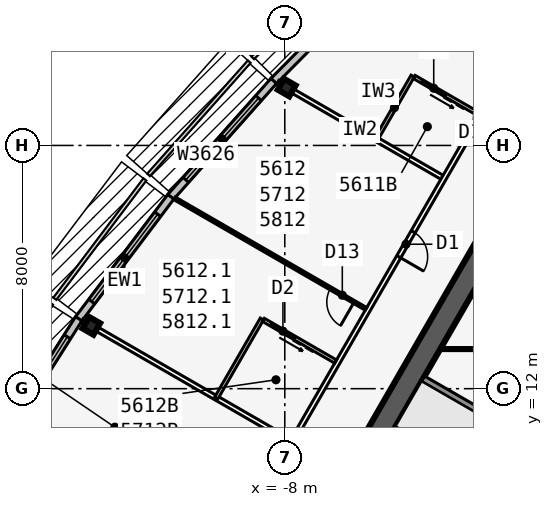
"""IFC4 building model, lengths in metres.
Left out: names, types, materials, properties, quantities, classifications, styles, units other than length and angle.
Written with IfcOpenShell. Run it as: python <this file> out.ifc"""

import sys

from ifc_helpers import new_model, si_unit, direction, frame, frame_2d, origin, origin_2d, place, context, subcontext, project, spatial, rectangle, i_section, extrude, element, fill, save


model = new_model("IFC4")
c1 = context("Model", 3, precision=1e-05, world=origin(), true_north=direction((0.0, 1.0)))
c2 = subcontext(c1, "Body", "Model", "MODEL_VIEW")
j1 = project(units=[si_unit("LENGTHUNIT", "METRE"), si_unit("PLANEANGLEUNIT", "RADIAN")], contexts=[c1])
p1 = place(None, origin())
s1 = spatial("IfcSite", under=j1, at=p1, CompositionType="ELEMENT")
p2 = place(p1, origin())
s2 = spatial("IfcBuilding", under=s1, at=p2, CompositionType="ELEMENT")
p3 = place(p2, frame((0.0, 0.0, 211.7)))
s3 = spatial("IfcBuildingStorey", under=s2, at=p3, CompositionType="ELEMENT", Elevation=211.7)
p4 = place(p3, frame((0.0, 19.052, 0.0), z_axis=(0.0, 0.0, 1.0), x_axis=(-0.499999749417, -0.866025548458, 0.0)))
e1 = element("IfcWall", 1, at=p4, inside=s3, PredefinedType="SHEAR", context=c2, shape_type="SweptSolid", body=[
    extrude(rectangle(XDim=33.0, YDim=0.75, at=frame_2d((16.5, 0.0))), origin(), (0.0, 0.0, 1.0), 3.6),
])
p5 = place(p4, frame((14.15, 0.0, 0.0)))
e2 = element("IfcOpeningElement", 2, at=p5, cuts=e1, PredefinedType="OPENING", context=c2, shape_type="SweptSolid", body=[
    extrude(rectangle(XDim=1.8, YDim=2.13, at=frame_2d((0.9, 1.065))), frame((0.0, 0.385, 0.0), z_axis=(0.0, -1.0, 0.0), x_axis=(1.0, 0.0, 0.0)), (0.0, 0.0, 1.0), 0.77),
])
p6 = place(p4, frame((12.6, 0.0, 0.0)))
e3 = element("IfcOpeningElement", 3, at=p6, cuts=e1, PredefinedType="OPENING", context=c2, shape_type="SweptSolid", body=[
    extrude(rectangle(XDim=1.0, YDim=2.13, at=frame_2d((0.5, 1.065))), frame((0.0, 0.385, 0.0), z_axis=(0.0, -1.0, 0.0), x_axis=(1.0, 0.0, 0.0)), (0.0, 0.0, 1.0), 0.77),
])
p7 = place(p3, frame((-0.062, 11.794, 0.0), z_axis=(0.0, 0.0, 1.0), x_axis=(-0.500006680225, -0.86602154692, 0.0)))
e4 = element("IfcWall", 4, at=p7, inside=s3, PredefinedType="SOLIDWALL", context=c2, shape_type="SweptSolid", body=[
    extrude(rectangle(XDim=7.733, YDim=0.25, at=frame_2d((3.866, 0.0))), origin(), (0.0, 0.0, 1.0), 3.435),
])
p8 = place(p3, frame((-0.679, 10.727, 0.0), z_axis=(0.0, 0.0, 1.0), x_axis=(-0.866008981251, 0.500028443584, 0.0)))
e5 = element("IfcWall", 5, at=p8, inside=s3, PredefinedType="SOLIDWALL", context=c2, shape_type="SweptSolid", body=[
    extrude(rectangle(XDim=3.2, YDim=0.2, at=frame_2d((1.6, 0.0))), origin(), (0.0, 0.0, 1.0), 3.435),
])
for number, where, z_axis, x_axis in (
    (6, (-7.937, 21.903, 0.0), (0.0, 0.0, 1.0), (-0.5, -0.866, 0.0)),
    (7, (-14.363, 14.066, 0.0), (0.0, 0.0, 1.0), (-0.866, 0.5, 0.0)),
):
    element("IfcColumn", number, at=place(p3, frame(where, z_axis=z_axis, x_axis=x_axis)), inside=s3, PredefinedType="COLUMN", context=c2, shape_type="SweptSolid", body=[
        extrude(i_section(OverallWidth=0.411, OverallDepth=0.434, WebThickness=0.036, FlangeThickness=0.057, at=origin_2d()), origin(), (0.0, 0.0, 1.0), 3.6),
    ])
p9 = place(p3, frame((-6.911, 23.583, 0.0), z_axis=(0.0, 0.0, 1.0), x_axis=(-0.704149946111, -0.710051303352, 0.0)))
e8 = element("IfcWall", 8, at=p9, inside=s3, PredefinedType="STANDARD", context=c2, shape_type="SweptSolid", body=[
    extrude(rectangle(XDim=2.069, YDim=0.25, at=frame_2d((1.034, 0.0))), origin(), (0.0, 0.0, 1.0), 3.435),
])
p10 = place(p3, frame((-8.363, 22.12, 0.0), z_axis=(0.0, 0.0, 1.0), x_axis=(-0.664348996191, -0.747422511876, 0.0)))
e9 = element("IfcWall", 9, at=p10, inside=s3, PredefinedType="STANDARD", context=c2, shape_type="SweptSolid", body=[
    extrude(rectangle(XDim=5.105, YDim=0.25, at=frame_2d((2.552, 0.0))), origin(), (0.0, 0.0, 1.0), 3.435),
])
p11 = place(p10, frame((0.752, 0.0, 0.45)))
e10 = element("IfcOpeningElement", 10, at=p11, cuts=e9, PredefinedType="OPENING", context=c2, shape_type="SweptSolid", body=[
    extrude(rectangle(XDim=3.6, YDim=2.6, at=frame_2d((1.8, 1.3))), frame((0.0, 0.135, 0.0), z_axis=(0.0, -1.0, 0.0), x_axis=(1.0, 0.0, 0.0)), (0.0, 0.0, 1.0), 0.27),
])
p12 = place(p3, frame((-11.748, 18.312, 0.0), z_axis=(0.0, 0.0, 1.0), x_axis=(-0.602408653511, -0.798187831388, 0.0)))
e11 = element("IfcWall", 11, at=p12, inside=s3, PredefinedType="STANDARD", context=c2, shape_type="SweptSolid", body=[
    extrude(rectangle(XDim=5.038, YDim=0.25, at=frame_2d((2.519, 0.0))), origin(), (0.0, 0.0, 1.0), 3.435),
])
p13 = place(p12, frame((0.719, 0.0, 0.45)))
e12 = element("IfcOpeningElement", 12, at=p13, cuts=e11, PredefinedType="OPENING", context=c2, shape_type="SweptSolid", body=[
    extrude(rectangle(XDim=3.6, YDim=2.6, at=frame_2d((1.8, 1.3))), frame((0.0, 0.135, 0.0), z_axis=(0.0, -1.0, 0.0), x_axis=(1.0, 0.0, 0.0)), (0.0, 0.0, 1.0), 0.27),
])
p14 = place(p3, frame((-14.777, 14.299, 0.0), z_axis=(0.0, 0.0, 1.0), x_axis=(-0.535220361449, -0.844712474568, 0.0)))
e13 = element("IfcWall", 13, at=p14, inside=s3, PredefinedType="STANDARD", context=c2, shape_type="SweptSolid", body=[
    extrude(rectangle(XDim=5.004, YDim=0.25, at=frame_2d((2.502, 0.0))), origin(), (0.0, 0.0, 1.0), 3.435),
])
p15 = place(p14, frame((0.702, 0.0, 0.45)))
e14 = element("IfcOpeningElement", 14, at=p15, cuts=e13, PredefinedType="OPENING", context=c2, shape_type="SweptSolid", body=[
    extrude(rectangle(XDim=3.6, YDim=2.6, at=frame_2d((1.8, 1.3))), frame((0.0, 0.135, 0.0), z_axis=(0.0, -1.0, 0.0), x_axis=(1.0, 0.0, 0.0)), (0.0, 0.0, 1.0), 0.27),
])
p16 = place(p3, frame((-0.425, 22.966, 0.0), z_axis=(0.0, 0.0, 1.0), x_axis=(-0.500000265775, -0.866025250339, 0.0)))
e15 = element("IfcWall", 15, at=p16, inside=s3, PredefinedType="PARTITIONING", context=c2, shape_type="SweptSolid", body=[
    extrude(rectangle(XDim=39.354, YDim=0.15, at=frame_2d((19.677, 0.0))), origin(), (0.0, 0.0, 1.0), 3.435),
])
p17 = place(p16, frame((1.102, 0.0, 0.0)))
e16 = element("IfcOpeningElement", 16, at=p17, cuts=e15, PredefinedType="OPENING", context=c2, shape_type="SweptSolid", body=[
    extrude(rectangle(XDim=0.95, YDim=2.13, at=frame_2d((0.475, 1.065))), frame((0.0, 0.085, 0.0), z_axis=(0.0, -1.0, 0.0), x_axis=(1.0, 0.0, 0.0)), (0.0, 0.0, 1.0), 0.17),
])
p18 = place(p16, frame((6.702, 0.0, 0.0)))
e17 = element("IfcOpeningElement", 17, at=p18, cuts=e15, PredefinedType="OPENING", context=c2, shape_type="SweptSolid", body=[
    extrude(rectangle(XDim=0.95, YDim=2.13, at=frame_2d((0.475, 1.065))), frame((0.0, 0.085, 0.0), z_axis=(0.0, -1.0, 0.0), x_axis=(1.0, 0.0, 0.0)), (0.0, 0.0, 1.0), 0.17),
])
p19 = place(p16, frame((16.702, 0.0, 0.0)))
e18 = element("IfcOpeningElement", 18, at=p19, cuts=e15, PredefinedType="OPENING", context=c2, shape_type="SweptSolid", body=[
    extrude(rectangle(XDim=0.95, YDim=2.13, at=frame_2d((0.475, 1.065))), frame((0.0, 0.085, 0.0), z_axis=(0.0, -1.0, 0.0), x_axis=(1.0, 0.0, 0.0)), (0.0, 0.0, 1.0), 0.17),
])
p20 = place(p16, frame((26.102, 0.0, 0.0)))
e19 = element("IfcOpeningElement", 19, at=p20, cuts=e15, PredefinedType="OPENING", context=c2, shape_type="SweptSolid", body=[
    extrude(rectangle(XDim=0.95, YDim=2.13, at=frame_2d((0.475, 1.065))), frame((0.0, 0.085, 0.0), z_axis=(0.0, -1.0, 0.0), x_axis=(1.0, 0.0, 0.0)), (0.0, 0.0, 1.0), 0.17),
])
p21 = place(p16, frame((32.302, 0.0, 0.0)))
e20 = element("IfcOpeningElement", 20, at=p21, cuts=e15, PredefinedType="OPENING", context=c2, shape_type="SweptSolid", body=[
    extrude(rectangle(XDim=0.95, YDim=2.13, at=frame_2d((0.475, 1.065))), frame((0.0, 0.085, 0.0), z_axis=(0.0, -1.0, 0.0), x_axis=(1.0, 0.0, 0.0)), (0.0, 0.0, 1.0), 0.17),
])
p22 = place(p16, frame((37.302, 0.0, 0.0)))
e21 = element("IfcOpeningElement", 21, at=p22, cuts=e15, PredefinedType="OPENING", context=c2, shape_type="SweptSolid", body=[
    extrude(rectangle(XDim=0.95, YDim=2.13, at=frame_2d((0.475, 1.065))), frame((0.0, 0.085, 0.0), z_axis=(0.0, -1.0, 0.0), x_axis=(1.0, 0.0, 0.0)), (0.0, 0.0, 1.0), 0.17),
])
p23 = place(p3, frame((-2.829, 18.954, 0.0), z_axis=(0.0, 0.0, 1.0), x_axis=(-0.866026604282, 0.499997920671, 0.0)))
e22 = element("IfcWall", 22, at=p23, inside=s3, PredefinedType="PARTITIONING", context=c2, shape_type="SweptSolid", body=[
    extrude(rectangle(XDim=6.24, YDim=0.15, at=frame_2d((3.12, 0.0))), origin(), (0.0, 0.0, 1.0), 2.589),
])
p24 = place(p3, frame((-5.329, 14.623, 0.0), z_axis=(0.0, 0.0, 1.0), x_axis=(-0.866017877653, 0.500013035415, 0.0)))
e23 = element("IfcWall", 23, at=p24, inside=s3, PredefinedType="PARTITIONING", context=c2, shape_type="SweptSolid", body=[
    extrude(rectangle(XDim=7.273, YDim=0.1, at=frame_2d((3.636, 0.0))), origin(), (0.0, 0.0, 1.0), 2.589),
])
p25 = place(p24, frame((0.45, 0.0, 0.0)))
e24 = element("IfcOpeningElement", 24, at=p25, cuts=e23, PredefinedType="OPENING", context=c2, shape_type="SweptSolid", body=[
    extrude(rectangle(XDim=0.9, YDim=2.13, at=frame_2d((0.45, 1.065))), frame((0.0, 0.06, 0.0), z_axis=(0.0, -1.0, 0.0), x_axis=(1.0, 0.0, 0.0)), (0.0, 0.0, 1.0), 0.12),
])
p26 = place(p3, frame((-7.829, 10.293, 0.0), z_axis=(0.0, 0.0, 1.0), x_axis=(-0.866030558329, 0.49999107196, 0.0)))
e25 = element("IfcWall", 25, at=p26, inside=s3, PredefinedType="PARTITIONING", context=c2, shape_type="SweptSolid", body=[
    extrude(rectangle(XDim=7.894, YDim=0.15, at=frame_2d((3.947, 0.0))), origin(), (0.0, 0.0, 1.0), 2.589),
])
p27 = place(p3, frame((-3.793, 22.282, 0.0), z_axis=(0.0, 0.0, 1.0), x_axis=(-0.500001309137, -0.866024647952, 0.0)))
e26 = element("IfcWall", 26, at=p27, inside=s3, PredefinedType="PLUMBINGWALL", context=c2, shape_type="SweptSolid", body=[
    extrude(rectangle(XDim=2.4, YDim=0.12, at=frame_2d((1.2, 0.0))), origin(), (0.0, 0.0, 1.0), 3.435),
])
p28 = place(p3, frame((-1.628, 21.032, 0.0), z_axis=(0.0, 0.0, 1.0), x_axis=(-0.866048967903, 0.499959183527, 0.0)))
e27 = element("IfcWall", 27, at=p28, inside=s3, PredefinedType="PLUMBINGWALL", context=c2, shape_type="SweptSolid", body=[
    extrude(rectangle(XDim=2.44, YDim=0.12, at=frame_2d((1.22, 0.0))), origin(), (0.0, 0.0, 1.0), 3.435),
])
p29 = place(p28, frame((1.25, 0.0, 0.0)))
e28 = element("IfcOpeningElement", 28, at=p29, cuts=e27, PredefinedType="OPENING", context=c2, shape_type="SweptSolid", body=[
    extrude(rectangle(XDim=0.9, YDim=2.13, at=frame_2d((0.45, 1.065))), frame((0.0, 0.07, 0.0), z_axis=(0.0, -1.0, 0.0), x_axis=(1.0, 0.0, 0.0)), (0.0, 0.0, 1.0), 0.14),
])
p30 = place(p3, frame((-8.753, 14.291, 0.0), z_axis=(0.0, 0.0, 1.0), x_axis=(-0.50002537861, -0.866010750942, 0.0)))
e29 = element("IfcWall", 29, at=p30, inside=s3, PredefinedType="PLUMBINGWALL", context=c2, shape_type="SweptSolid", body=[
    extrude(rectangle(XDim=3.0, YDim=0.12, at=frame_2d((1.5, 0.0))), origin(), (0.0, 0.0, 1.0), 3.435),
])
p31 = place(p3, frame((-6.329, 12.891, 0.0), z_axis=(0.0, 0.0, 1.0), x_axis=(-0.866035715982, 0.499982138324, 0.0)))
e30 = element("IfcWall", 30, at=p31, inside=s3, PredefinedType="PLUMBINGWALL", context=c2, shape_type="SweptSolid", body=[
    extrude(rectangle(XDim=2.74, YDim=0.12, at=frame_2d((1.37, 0.0))), origin(), (0.0, 0.0, 1.0), 3.435),
])
p32 = place(p31, frame((1.55, 0.0, 0.0)))
e31 = element("IfcOpeningElement", 31, at=p32, cuts=e30, PredefinedType="OPENING", context=c2, shape_type="SweptSolid", body=[
    extrude(rectangle(XDim=0.9, YDim=2.13, at=frame_2d((0.45, 1.065))), frame((0.0, 0.07, 0.0), z_axis=(0.0, -1.0, 0.0), x_axis=(1.0, 0.0, 0.0)), (0.0, 0.0, 1.0), 0.14),
])
p33 = place(p3, frame((-2.887, 13.302, 0.0), z_axis=(0.0, 0.0, 1.0), x_axis=(1.0, 0.0, 0.0)))
e32 = element("IfcWall", 32, at=p33, inside=s3, PredefinedType="PARTITIONING", context=c2, shape_type="SweptSolid", body=[
    extrude(rectangle(XDim=5.773, YDim=0.1, at=frame_2d((2.887, 0.0))), origin(), (0.0, 0.0, 1.0), 3.435),
])
p34 = place(p33, frame((2.437, 0.0, 0.0)))
e33 = element("IfcOpeningElement", 33, at=p34, cuts=e32, PredefinedType="OPENING", context=c2, shape_type="SweptSolid", body=[
    extrude(rectangle(XDim=0.9, YDim=2.13, at=frame_2d((0.45, 1.065))), frame((0.0, 0.06, 0.0), z_axis=(0.0, -1.0, 0.0), x_axis=(1.0, 0.0, 0.0)), (0.0, 0.0, 1.0), 0.12),
])
p35 = place(p11, origin())
e34 = element("IfcWindow", 34, at=p35, inside=s3, PartitioningType="SINGLE_PANEL", PredefinedType="WINDOW", context=c2, shape_type="SweptSolid", body=[
    extrude(rectangle(XDim=3.6, YDim=2.6, at=frame_2d((1.8, 1.3))), frame((0.0, 0.03, 0.0), z_axis=(0.0, -1.0, 0.0), x_axis=(1.0, 0.0, 0.0)), (0.0, 0.0, 1.0), 0.06),
])
fill(e10, e34)
p36 = place(p13, origin())
e35 = element("IfcWindow", 35, at=p36, inside=s3, PartitioningType="SINGLE_PANEL", PredefinedType="WINDOW", context=c2, shape_type="SweptSolid", body=[
    extrude(rectangle(XDim=3.6, YDim=2.6, at=frame_2d((1.8, 1.3))), frame((0.0, 0.03, 0.0), z_axis=(0.0, -1.0, 0.0), x_axis=(1.0, 0.0, 0.0)), (0.0, 0.0, 1.0), 0.06),
])
fill(e12, e35)
p37 = place(p15, origin())
e36 = element("IfcWindow", 36, at=p37, inside=s3, PartitioningType="SINGLE_PANEL", PredefinedType="WINDOW", context=c2, shape_type="SweptSolid", body=[
    extrude(rectangle(XDim=3.6, YDim=2.6, at=frame_2d((1.8, 1.3))), frame((0.0, 0.03, 0.0), z_axis=(0.0, -1.0, 0.0), x_axis=(1.0, 0.0, 0.0)), (0.0, 0.0, 1.0), 0.06),
])
fill(e14, e36)
p38 = place(p25, origin())
e37 = element("IfcDoor", 37, at=p38, inside=s3, OperationType="SINGLE_SWING_LEFT", PredefinedType="DOOR", context=c2, shape_type="SweptSolid", body=[
    extrude(rectangle(XDim=0.9, YDim=2.13, at=frame_2d((0.45, 1.065))), frame((0.0, 0.025, 0.0), z_axis=(0.0, -1.0, 0.0), x_axis=(1.0, 0.0, 0.0)), (0.0, 0.0, 1.0), 0.05),
])
fill(e24, e37)
p39 = place(p29, origin())
e38 = element("IfcDoor", 38, at=p39, inside=s3, OperationType="SLIDING_TO_LEFT", PredefinedType="DOOR", context=c2, shape_type="SweptSolid", body=[
    extrude(rectangle(XDim=0.9, YDim=2.13, at=frame_2d((0.45, 1.065))), frame((0.0, 0.025, 0.0), z_axis=(0.0, -1.0, 0.0), x_axis=(1.0, 0.0, 0.0)), (0.0, 0.0, 1.0), 0.05),
])
fill(e28, e38)
p40 = place(p18, origin())
e39 = element("IfcDoor", 39, at=p40, inside=s3, OperationType="SINGLE_SWING_RIGHT", PredefinedType="DOOR", context=c2, shape_type="SweptSolid", body=[
    extrude(rectangle(XDim=0.95, YDim=2.13, at=frame_2d((0.475, 1.065))), frame((0.0, 0.025, 0.0), z_axis=(0.0, -1.0, 0.0), x_axis=(1.0, 0.0, 0.0)), (0.0, 0.0, 1.0), 0.05),
])
fill(e17, e39)
p41 = place(p32, origin())
e40 = element("IfcDoor", 40, at=p41, inside=s3, OperationType="SLIDING_TO_LEFT", PredefinedType="DOOR", context=c2, shape_type="SweptSolid", body=[
    extrude(rectangle(XDim=0.9, YDim=2.13, at=frame_2d((0.45, 1.065))), frame((0.0, 0.025, 0.0), z_axis=(0.0, -1.0, 0.0), x_axis=(1.0, 0.0, 0.0)), (0.0, 0.0, 1.0), 0.05),
])
fill(e31, e40)
save(model, sys.argv[1])
